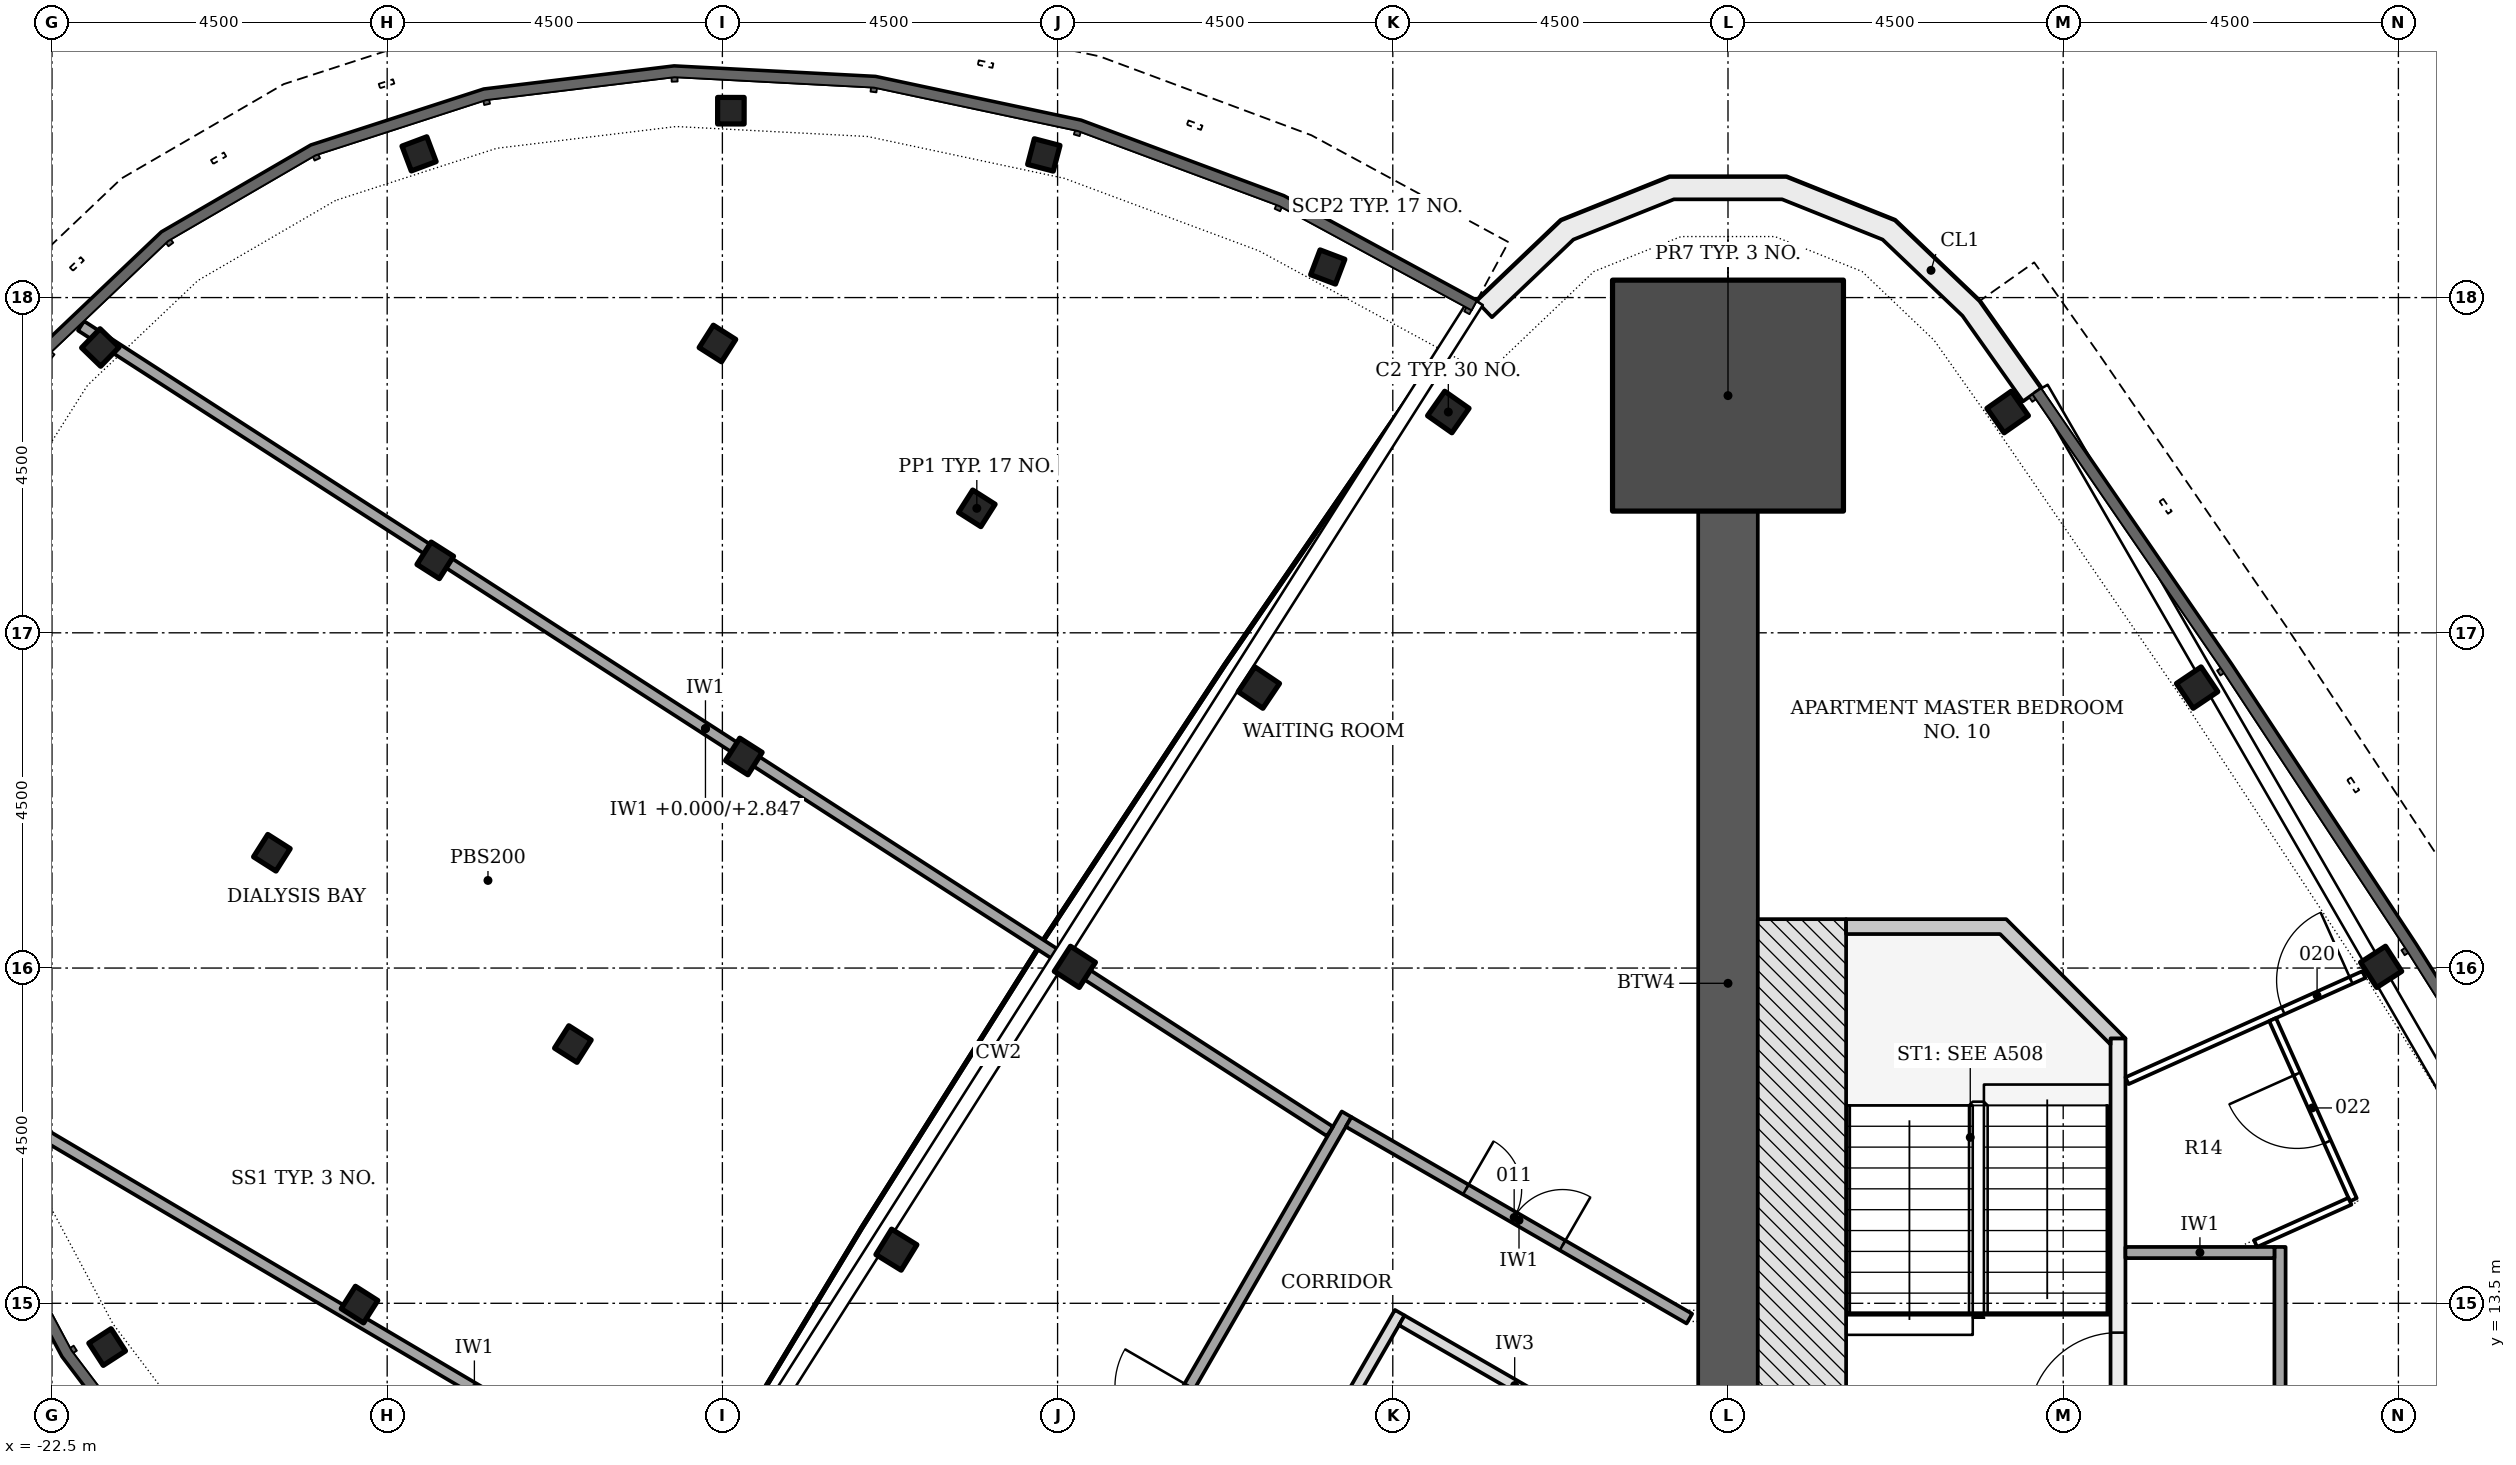
"""IFC4 building model, lengths in metres.
Left out: names, types, materials, properties, quantities, classifications, styles, units other than length and angle.
Written with IfcOpenShell. Run it as: python <this file> out.ifc"""

import sys

from ifc_helpers import new_model, si_unit, direction, frame, frame_2d, origin, origin_2d, place, context, subcontext, project, spatial, polyline, rectangle, hollow_rectangle, i_section, outline, extrude, element, fill, save


model = new_model("IFC4")
c1 = context("Model", 3, precision=1e-05, world=origin(), true_north=direction((0.0, 1.0)))
c2 = subcontext(c1, "Body", "Model", "MODEL_VIEW")
j1 = project(units=[si_unit("LENGTHUNIT", "METRE"), si_unit("PLANEANGLEUNIT", "RADIAN")], contexts=[c1])
p1 = place(None, origin())
s1 = spatial("IfcSite", under=j1, at=p1, CompositionType="ELEMENT")
p2 = place(p1, origin())
s2 = spatial("IfcBuilding", under=s1, at=p2, CompositionType="ELEMENT")
p3 = place(p2, frame((0.0, 0.0, 98.7)))
s3 = spatial("IfcBuildingStorey", under=s2, at=p3, CompositionType="ELEMENT", Elevation=98.7)
p4 = place(p3, frame((0.0, 11.456, -0.2), z_axis=(0.0, 0.0, 1.0), x_axis=(0.0, 1.0, 0.0)))
e1 = element("IfcWall", 1, at=p4, inside=s3, PredefinedType="SHEAR", context=c2, shape_type="SweptSolid", body=[
    extrude(rectangle(XDim=12.678, YDim=0.8, at=frame_2d((6.339, 0.0))), origin(), (0.0, 0.0, 1.0), 3.6),
])
p5 = place(p3, frame((0.0, 25.684, -0.2), z_axis=(0.0, 0.0, 1.0), x_axis=(0.0, 1.0, 0.0)))
e2 = element("IfcColumn", 2, at=p5, inside=s3, PredefinedType="COLUMN", context=c2, shape_type="SweptSolid", body=[
    extrude(rectangle(XDim=3.1, YDim=3.1, at=origin_2d()), origin(), (0.0, 0.0, 1.0), 3.6),
])
for number, where, z_axis, x_axis in (
    (3, (-3.755, 25.464, -0.2), (0.0, 0.0, 1.0), (-0.575, -0.818, 0.0)),
    (4, (-6.298, 21.765, -0.2), (0.0, 0.0, 1.0), (-0.558, -0.83, 0.0)),
    (5, (-8.768, 18.016, -0.2), (0.0, 0.0, 1.0), (-0.542, -0.84, 0.0)),
    (6, (-11.164, 14.22, -0.2), (0.0, 0.0, 1.0), (-0.525, -0.851, 0.0)),
    (7, (8.768, 18.016, -0.2), (0.0, 0.0, 1.0), (-0.542, 0.84, 0.0)),
    (8, (6.298, 21.765, -0.2), (0.0, 0.0, 1.0), (-0.558, 0.83, 0.0)),
    (9, (3.755, 25.464, -0.2), (0.0, 0.0, 1.0), (-0.575, 0.818, 0.0)),
):
    element("IfcColumn", number, at=place(p3, frame(where, z_axis=z_axis, x_axis=x_axis)), inside=s3, PredefinedType="COLUMN", context=c2, shape_type="SweptSolid", body=[
        extrude(i_section(OverallWidth=0.401, OverallDepth=0.399, WebThickness=0.025, FlangeThickness=0.04, FilletRadius=0.015, at=origin_2d()), origin(), (0.0, 0.0, 1.0), 3.6),
    ])
for number, where, z_axis, x_axis in (
    (10, (-10.084, 24.171, -0.2), (0.0, 0.0, 1.0), (-0.844, 0.536, 0.0)),
    (11, (-13.566, 26.384, -0.2), (0.0, 0.0, 1.0), (-0.844, 0.536, 0.0)),
    (12, (-13.212, 20.84, -0.2), (0.0, 0.0, 1.0), (-0.844, 0.536, 0.0)),
    (13, (-17.354, 23.473, -0.2), (0.0, 0.0, 1.0), (-0.844, 0.536, 0.0)),
    (14, (-15.507, 16.98, -0.2), (0.0, 0.0, 1.0), (-0.844, 0.536, 0.0)),
    (15, (-19.548, 19.548, -0.2), (0.0, 0.0, 1.0), (-0.844, 0.536, 0.0)),
    (16, (-18.372, 13.483, -0.2), (0.0, 0.0, 1.0), (-0.844, 0.536, 0.0)),
    (17, (-5.373, 27.41, -0.2), (0.0, 0.0, 1.0), (-0.935, 0.355, 0.0)),
    (18, (-9.185, 28.915, -0.2), (0.0, 0.0, 1.0), (-0.967, 0.253, 0.0)),
    (19, (-13.386, 29.509, -0.2), (0.0, 0.0, 1.0), (-1.0, 0.002, 0.0)),
    (20, (-17.572, 28.929, -0.2), (0.0, 0.0, 1.0), (-0.936, -0.352, 0.0)),
    (21, (-21.851, 26.33, -0.2), (0.0, 0.0, 1.0), (-0.696, -0.718, 0.0)),
    (22, (-21.759, 12.913, -0.2), (0.0, 0.0, 1.0), (0.543, -0.839, 0.0)),
):
    element("IfcColumn", number, at=place(p3, frame(where, z_axis=z_axis, x_axis=x_axis)), inside=s3, PredefinedType="COLUMN", context=c2, shape_type="SweptSolid", body=[
        extrude(hollow_rectangle(XDim=0.356, YDim=0.356, WallThickness=0.013, at=origin_2d()), origin(), (0.0, 0.0, 1.0), 3.6),
    ])
p6 = place(p3, origin())
e23 = element("IfcWall", 23, at=p6, inside=s3, PredefinedType="NOTDEFINED", context=c2, shape_type="SweptSolid", body=[
    extrude(outline(polyline([(4.205, 25.78), (3.375, 26.953), (2.24, 28.035), (0.784, 28.619), (-0.784, 28.619), (-2.24, 28.035), (-3.375, 26.953), (-3.168, 26.736), (-2.075, 27.779), (-0.727, 28.319), (0.727, 28.319), (2.075, 27.779), (3.147, 26.756), (3.96, 25.606), (4.205, 25.78)])), origin(), (0.0, 0.0, 1.0), 3.3),
])
p7 = place(p3, frame((5.236, 11.456, -0.2), z_axis=(0.0, 0.0, 1.0), x_axis=(0.0, 1.0, 0.0)))
e24 = element("IfcWall", 24, at=p7, inside=s3, PredefinedType="SHEAR", context=c2, shape_type="SweptSolid", body=[
    extrude(rectangle(XDim=5.6, YDim=0.2, at=frame_2d((2.8, 0.0))), origin(), (0.0, 0.0, 1.0), 3.6),
])
p8 = place(p7, frame((0.45, 0.0, 0.2)))
e25 = element("IfcOpeningElement", 25, at=p8, cuts=e24, PredefinedType="OPENING", context=c2, shape_type="SweptSolid", body=[
    extrude(rectangle(XDim=1.2, YDim=2.1, at=frame_2d((0.6, 1.05))), frame((0.0, 0.11, 0.0), z_axis=(0.0, -1.0, 0.0), x_axis=(1.0, 0.0, 0.0)), (0.0, 0.0, 1.0), 0.22),
])
p9 = place(p3, frame((0.993, 11.456, -0.2), z_axis=(0.0, 0.0, 1.0), x_axis=(0.0, 1.0, 0.0)))
e26 = element("IfcWall", 26, at=p9, inside=s3, PredefinedType="SHEAR", context=c2, shape_type="SweptSolid", body=[
    extrude(rectangle(XDim=7.2, YDim=1.186, at=frame_2d((3.6, 0.0))), origin(), (0.0, 0.0, 1.0), 3.6),
])
p10 = place(p3, frame((0.0, 0.0, -0.2)))
e27 = element("IfcWall", 27, at=p10, inside=s3, PredefinedType="SHEAR", context=c2, shape_type="SweptSolid", body=[
    extrude(outline(polyline([(5.336, 17.056), (3.736, 18.656), (1.586, 18.656), (1.586, 18.456), (3.653, 18.456), (5.135, 16.974), (5.135, 17.056), (5.135, 17.056), (5.135, 17.056), (5.135, 17.056), (5.135, 17.056), (5.135, 17.056), (5.135, 17.056), (5.135, 17.056), (5.135, 17.056), (5.135, 17.056), (5.135, 17.056), (5.135, 17.056), (5.135, 17.056), (5.135, 17.056), (5.135, 17.056), (5.135, 17.056), (5.135, 17.056), (5.336, 17.056)])), origin(), (0.0, 0.0, 1.0), 3.6),
])
p11 = place(p3, frame((-16.169, -3.099, 0.0), z_axis=(0.0, 0.0, 1.0), x_axis=(0.499999805269, 0.866025516212, 0.0)))
e28 = element("IfcWall", 28, at=p11, inside=s3, PredefinedType="PARTITIONING", context=c2, shape_type="SweptSolid", body=[
    extrude(rectangle(XDim=22.097, YDim=0.15, at=frame_2d((11.049, 0.0))), origin(), (0.0, 0.0, 1.0), 2.778),
])
p12 = place(p11, frame((16.878, 0.0, 0.0)))
e29 = element("IfcOpeningElement", 29, at=p12, cuts=e28, PredefinedType="OPENING", context=c2, shape_type="SweptSolid", body=[
    extrude(rectangle(XDim=1.0, YDim=2.1, at=frame_2d((0.5, 1.05))), frame((0.0, 0.085, 0.0), z_axis=(0.0, -1.0, 0.0), x_axis=(1.0, 0.0, 0.0)), (0.0, 0.0, 1.0), 0.17),
])
p13 = place(p11, frame((7.816, 0.0, 0.0)))
e30 = element("IfcOpeningElement", 30, at=p13, cuts=e28, PredefinedType="OPENING", context=c2, shape_type="SweptSolid", body=[
    extrude(rectangle(XDim=1.5, YDim=2.1, at=frame_2d((0.75, 1.05))), frame((0.0, 0.085, 0.0), z_axis=(0.0, -1.0, 0.0), x_axis=(1.0, 0.0, 0.0)), (0.0, 0.0, 1.0), 0.17),
])
p14 = place(p11, frame((1.2, 0.0, 0.0)))
e31 = element("IfcOpeningElement", 31, at=p14, cuts=e28, PredefinedType="OPENING", context=c2, shape_type="SweptSolid", body=[
    extrude(rectangle(XDim=1.5, YDim=2.1, at=frame_2d((0.75, 1.05))), frame((0.0, 0.085, 0.0), z_axis=(0.0, -1.0, 0.0), x_axis=(1.0, 0.0, 0.0)), (0.0, 0.0, 1.0), 0.17),
])
p15 = place(p3, frame((-4.407, 13.374, 0.0), z_axis=(0.0, 0.0, 1.0), x_axis=(-0.499997181693, -0.866027030928, 0.0)))
e32 = element("IfcWall", 32, at=p15, inside=s3, PredefinedType="PARTITIONING", context=c2, shape_type="SweptSolid", body=[
    extrude(rectangle(XDim=16.77, YDim=0.15, at=frame_2d((8.385, 0.0))), origin(), (0.0, 0.0, 1.0), 2.778),
])
p16 = place(p15, frame((8.879, 0.0, 0.0)))
e33 = element("IfcOpeningElement", 33, at=p16, cuts=e32, PredefinedType="OPENING", context=c2, shape_type="SweptSolid", body=[
    extrude(rectangle(XDim=1.0, YDim=2.1, at=frame_2d((0.5, 1.05))), frame((0.0, 0.085, 0.0), z_axis=(0.0, -1.0, 0.0), x_axis=(1.0, 0.0, 0.0)), (0.0, 0.0, 1.0), 0.17),
])
p17 = place(p3, frame((7.411, 14.256, 0.0), z_axis=(0.0, 0.0, 1.0), x_axis=(0.0, -1.0, 0.0)))
e34 = element("IfcWall", 34, at=p17, inside=s3, PredefinedType="PARTITIONING", context=c2, shape_type="SweptSolid", body=[
    extrude(rectangle(XDim=5.95, YDim=0.15, at=frame_2d((2.975, 0.0))), origin(), (0.0, 0.0, 1.0), 2.778),
])
p18 = place(p17, frame((2.475, 0.0, 0.0)))
e35 = element("IfcOpeningElement", 35, at=p18, cuts=e34, PredefinedType="OPENING", context=c2, shape_type="SweptSolid", body=[
    extrude(rectangle(XDim=1.0, YDim=2.1, at=frame_2d((0.5, 1.05))), frame((0.0, 0.085, 0.0), z_axis=(0.0, -1.0, 0.0), x_axis=(1.0, 0.0, 0.0)), (0.0, 0.0, 1.0), 0.17),
])
p19 = place(p3, frame((-5.093, 15.935, 0.0), z_axis=(0.0, 0.0, 1.0), x_axis=(0.866033195618, -0.499986503906, 0.0)))
e36 = element("IfcWall", 36, at=p19, inside=s3, PredefinedType="PARTITIONING", context=c2, shape_type="SweptSolid", body=[
    extrude(rectangle(XDim=5.282, YDim=0.15, at=frame_2d((2.641, 0.0))), origin(), (0.0, 0.0, 1.0), 3.4),
])
p20 = place(p19, frame((1.816, 0.0, 0.0)))
e37 = element("IfcOpeningElement", 37, at=p20, cuts=e36, PredefinedType="OPENING", context=c2, shape_type="SweptSolid", body=[
    extrude(rectangle(XDim=1.5, YDim=2.1, at=frame_2d((0.75, 1.05))), frame((0.0, 0.085, 0.0), z_axis=(0.0, -1.0, 0.0), x_axis=(1.0, 0.0, 0.0)), (0.0, 0.0, 1.0), 0.17),
])
p21 = place(p3, frame((-4.379, 13.271, 0.0), z_axis=(0.0, 0.0, 1.0), x_axis=(0.866019471182, -0.500010275428, 0.0)))
e38 = element("IfcWall", 38, at=p21, inside=s3, PredefinedType="PARTITIONING", context=c2, shape_type="SweptSolid", body=[
    extrude(rectangle(XDim=3.5, YDim=0.15, at=frame_2d((1.75, 0.0))), origin(), (0.0, 0.0, 1.0), 3.4),
])
p22 = place(p3, frame((5.336, 14.181, 0.0), z_axis=(0.0, 0.0, 1.0), x_axis=(1.0, 0.0, 0.0)))
e39 = element("IfcWall", 39, at=p22, inside=s3, PredefinedType="PARTITIONING", context=c2, shape_type="SweptSolid", body=[
    extrude(rectangle(XDim=2.0, YDim=0.15, at=frame_2d((1.0, 0.0))), origin(), (0.0, 0.0, 1.0), 3.4),
])
p23 = place(p3, frame((-22.11, 26.621, 0.0), z_axis=(0.0, 0.0, 1.0), x_axis=(0.840382773847, -0.541993351823, 0.0)))
e40 = element("IfcWall", 40, at=p23, inside=s3, PredefinedType="PARTITIONING", context=c2, shape_type="SweptSolid", body=[
    extrude(rectangle(XDim=19.951, YDim=0.15, at=frame_2d((9.976, 0.0))), origin(), (0.0, 0.0, 1.0), 2.778),
])
p24 = place(p3, frame((-23.909, 16.533, 0.0), z_axis=(0.0, 0.0, 1.0), x_axis=(0.86106275482, -0.508498704288, 0.0)))
e41 = element("IfcWall", 41, at=p24, inside=s3, PredefinedType="PARTITIONING", context=c2, shape_type="SweptSolid", body=[
    extrude(rectangle(XDim=16.444, YDim=0.15, at=frame_2d((8.222, 0.0))), origin(), (0.0, 0.0, 1.0), 2.778),
])
p25 = place(p3, frame((5.356, 16.487, 0.0), z_axis=(0.0, 0.0, 1.0), x_axis=(0.912565214453, 0.408931203713, 0.0)))
e42 = element("IfcWall", 42, at=p25, inside=s3, PredefinedType="PARTITIONING", context=c2, shape_type="SweptSolid", body=[
    extrude(rectangle(XDim=3.485, YDim=0.1, at=frame_2d((1.743, 0.0))), origin(), (0.0, 0.0, 1.0), 2.974),
])
p26 = place(p25, frame((2.297, 0.0, 0.0)))
e43 = element("IfcOpeningElement", 43, at=p26, cuts=e42, PredefinedType="OPENING", context=c2, shape_type="SweptSolid", body=[
    extrude(rectangle(XDim=1.0, YDim=2.1, at=frame_2d((0.5, 1.05))), frame((0.0, 0.06, 0.0), z_axis=(0.0, -1.0, 0.0), x_axis=(1.0, 0.0, 0.0)), (0.0, 0.0, 1.0), 0.12),
])
p27 = place(p3, frame((8.395, 14.89, 0.0), z_axis=(0.0, 0.0, 1.0), x_axis=(-0.408965961138, 0.912549638448, 0.0)))
e44 = element("IfcWall", 44, at=p27, inside=s3, PredefinedType="PARTITIONING", context=c2, shape_type="SweptSolid", body=[
    extrude(rectangle(XDim=2.65, YDim=0.1, at=frame_2d((1.325, 0.0))), origin(), (0.0, 0.0, 1.0), 2.974),
])
p28 = place(p27, frame((0.85, 0.0, 0.0)))
e45 = element("IfcOpeningElement", 45, at=p28, cuts=e44, PredefinedType="OPENING", context=c2, shape_type="SweptSolid", body=[
    extrude(rectangle(XDim=1.0, YDim=2.1, at=frame_2d((0.5, 1.05))), frame((0.0, 0.06, 0.0), z_axis=(0.0, -1.0, 0.0), x_axis=(1.0, 0.0, 0.0)), (0.0, 0.0, 1.0), 0.12),
])
p29 = place(p3, frame((7.082, 14.302, 0.0), z_axis=(0.0, 0.0, 1.0), x_axis=(0.912545530992, 0.408975126221, 0.0)))
e46 = element("IfcWall", 46, at=p29, inside=s3, PredefinedType="PARTITIONING", context=c2, shape_type="SweptSolid", body=[
    extrude(rectangle(XDim=1.388, YDim=0.1, at=frame_2d((0.694, 0.0))), origin(), (0.0, 0.0, 1.0), 3.4),
])
p30 = place(p8, origin())
e47 = element("IfcDoor", 47, at=p30, inside=s3, OperationType="SINGLE_SWING_LEFT", PredefinedType="DOOR", context=c2, shape_type="SweptSolid", body=[
    extrude(rectangle(XDim=1.2, YDim=2.1, at=frame_2d((0.6, 1.05))), frame((0.0, 0.025, 0.0), z_axis=(0.0, -1.0, 0.0), x_axis=(1.0, 0.0, 0.0)), (0.0, 0.0, 1.0), 0.05),
])
fill(e25, e47)
p31 = place(p20, origin())
e48 = element("IfcDoor", 48, at=p31, inside=s3, OperationType="DOUBLE_DOOR_SINGLE_SWING", PredefinedType="DOOR", context=c2, shape_type="SweptSolid", body=[
    extrude(rectangle(XDim=1.5, YDim=2.1, at=frame_2d((0.75, 1.05))), frame((0.0, 0.025, 0.0), z_axis=(0.0, -1.0, 0.0), x_axis=(1.0, 0.0, 0.0)), (0.0, 0.0, 1.0), 0.05),
])
fill(e37, e48)
p32 = place(p26, origin())
e49 = element("IfcDoor", 49, at=p32, inside=s3, OperationType="SINGLE_SWING_RIGHT", PredefinedType="DOOR", context=c2, shape_type="SweptSolid", body=[
    extrude(rectangle(XDim=1.0, YDim=2.1, at=frame_2d((0.5, 1.05))), frame((0.0, 0.025, 0.0), z_axis=(0.0, -1.0, 0.0), x_axis=(1.0, 0.0, 0.0)), (0.0, 0.0, 1.0), 0.05),
])
fill(e43, e49)
p33 = place(p28, origin())
e50 = element("IfcDoor", 50, at=p33, inside=s3, OperationType="SINGLE_SWING_RIGHT", PredefinedType="DOOR", context=c2, shape_type="SweptSolid", body=[
    extrude(rectangle(XDim=1.0, YDim=2.1, at=frame_2d((0.5, 1.05))), frame((0.0, 0.025, 0.0), z_axis=(0.0, -1.0, 0.0), x_axis=(1.0, 0.0, 0.0)), (0.0, 0.0, 1.0), 0.05),
])
fill(e45, e50)
save(model, sys.argv[1])
